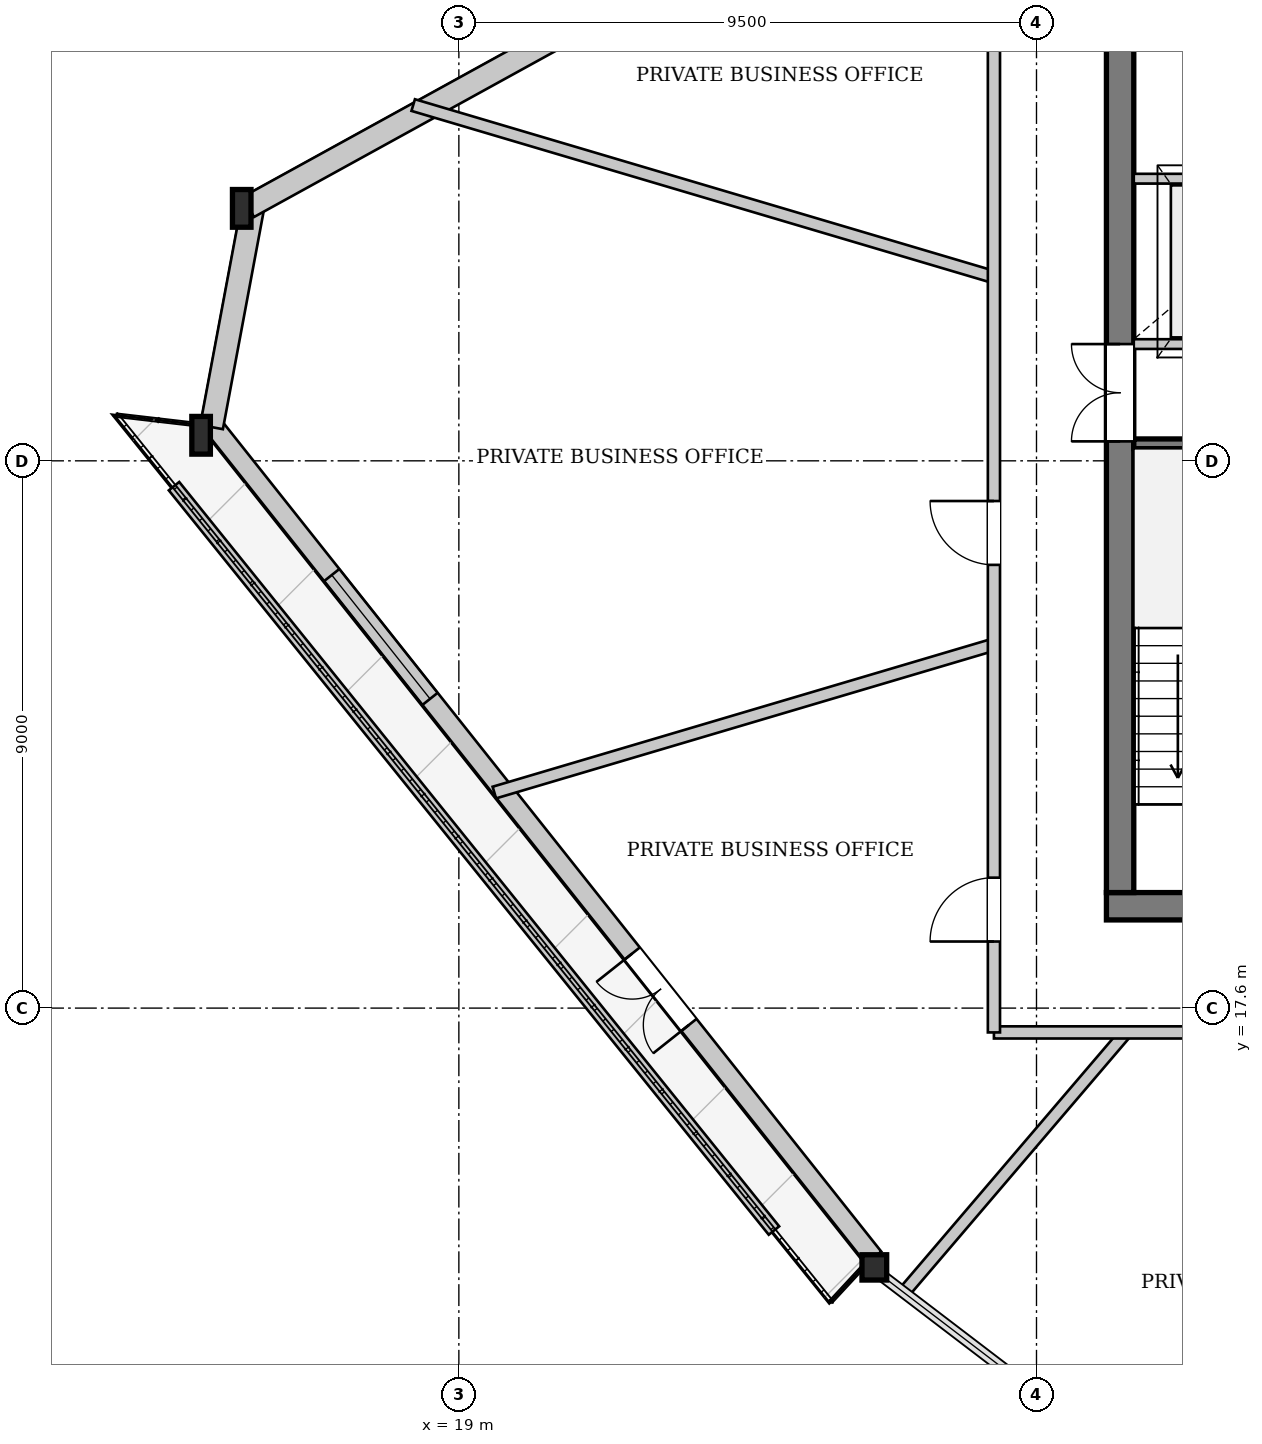
"""IFC4 building model, lengths in metres.
Left out: names, types, materials, properties, quantities, classifications, styles, units other than length and angle.
Written with IfcOpenShell. Run it as: python <this file> out.ifc"""

import sys

from ifc_helpers import new_model, si_unit, direction, frame, frame_2d, origin, origin_2d, place, context, subcontext, project, spatial, rectangle, i_section, extrude, source, transform, mapped, element, fill, save


model = new_model("IFC4")
c1 = context("Model", 3, precision=1e-05, world=origin(), true_north=direction((0.0, 1.0)))
c2 = subcontext(c1, "Body", "Model", "MODEL_VIEW")
j1 = project(units=[si_unit("LENGTHUNIT", "METRE"), si_unit("PLANEANGLEUNIT", "RADIAN")], contexts=[c1])
p1 = place(None, origin())
s1 = spatial("IfcSite", under=j1, at=p1, CompositionType="ELEMENT")
p2 = place(p1, origin())
s2 = spatial("IfcBuilding", under=s1, at=p2, CompositionType="ELEMENT")
p3 = place(p2, frame((0.0, 0.0, 227.35)))
s3 = spatial("IfcBuildingStorey", under=s2, at=p3, CompositionType="ELEMENT", Elevation=227.35)
m1 = source(origin(), c2, "Body", "SweptSolid", [
    extrude(i_section(OverallWidth=0.305, OverallDepth=0.62, WebThickness=0.021, FlangeThickness=0.04, at=origin_2d()), origin(), (0.0, 0.0, 1.0), 3.407),
])
p4 = place(p3, frame((15.448, 30.942, 0.0), z_axis=(-0.011036611477, -0.111942773549, 0.993653364437), x_axis=(0.99517500016, -0.098115845086, 0.0)))
e1 = element("IfcColumn", 1, at=p4, inside=s3, PredefinedType="COLUMN", context=c2, shape_type="MappedRepresentation", body=[
    mapped(m1, transform((0.0, 0.0, 0.0), x_axis=(1.0, 0.0, 0.0), y_axis=(0.0, 1.0, 0.0), z_axis=(0.0, 0.0, 1.0), scale=1.0)),
])
m2 = source(origin(), c2, "Body", "SweptSolid", [
    extrude(i_section(OverallWidth=0.305, OverallDepth=0.62, WebThickness=0.021, FlangeThickness=0.04, at=origin_2d()), origin(), (0.0, 0.0, 1.0), 3.402),
])
p5 = place(p3, frame((14.746, 27.19, 0.0), z_axis=(0.008898359586, -0.099819501483, 0.994965771432), x_axis=(0.9960501548, 0.088792393383, 0.0)))
e2 = element("IfcColumn", 2, at=p5, inside=s3, PredefinedType="COLUMN", context=c2, shape_type="MappedRepresentation", body=[
    mapped(m2, transform((0.0, 0.0, 0.0), x_axis=(1.0, 0.0, 0.0), y_axis=(0.0, 1.0, 0.0), z_axis=(0.0, 0.0, 1.0), scale=1.0)),
])
m3 = source(origin(), c2, "Body", "SweptSolid", [
    extrude(i_section(OverallWidth=0.406, OverallDepth=0.416, WebThickness=0.027, FlangeThickness=0.042, at=origin_2d()), origin(), (0.0, 0.0, 1.0), 3.398),
])
p6 = place(p3, frame((25.697, 13.397, 0.0), z_axis=(0.080321740107, -0.03599391037, 0.99611889676), x_axis=(0.40893871704, 0.912561847606, 0.0)))
e3 = element("IfcColumn", 3, at=p6, inside=s3, PredefinedType="COLUMN", context=c2, shape_type="MappedRepresentation", body=[
    mapped(m3, transform((0.0, 0.0, 0.0), x_axis=(1.0, 0.0, 0.0), y_axis=(0.0, 1.0, 0.0), z_axis=(0.0, 0.0, 1.0), scale=1.0)),
])
p7 = place(p3, frame((25.822, 13.497, 0.0), z_axis=(0.0, 0.0, 1.0), x_axis=(-0.621793124768, 0.783181530675, 0.0)))
e4 = element("IfcWall", 4, at=p7, inside=s3, PredefinedType="SOLIDWALL", context=c2, shape_type="SweptSolid", body=[
    extrude(rectangle(XDim=17.612, YDim=0.32, at=frame_2d((8.806, 0.0))), origin(), (0.0, 0.0, 1.0), 2.822),
])
p8 = place(p7, frame((4.886, 0.0, 0.0)))
e5 = element("IfcOpeningElement", 5, at=p8, cuts=e4, PredefinedType="OPENING", context=c2, shape_type="SweptSolid", body=[
    extrude(rectangle(XDim=1.5, YDim=2.3, at=frame_2d((0.75, 1.15))), frame((0.0, 0.17, 0.0), z_axis=(0.0, -1.0, 0.0), x_axis=(1.0, 0.0, 0.0)), (0.0, 0.0, 1.0), 0.34),
])
p9 = place(p7, frame((11.733, 0.0, 0.352)))
e6 = element("IfcOpeningElement", 6, at=p9, cuts=e4, PredefinedType="OPENING", context=c2, shape_type="SweptSolid", body=[
    extrude(rectangle(XDim=2.6, YDim=2.35, at=frame_2d((1.3, 1.175))), frame((0.0, 0.17, 0.0), z_axis=(0.0, -1.0, 0.0), x_axis=(1.0, 0.0, 0.0)), (0.0, 0.0, 1.0), 0.34),
])
p10 = place(p3, frame((14.933, 27.155, 0.0), z_axis=(0.0, 0.0, 1.0), x_axis=(0.183852218536, 0.98295389604, 0.0)))
e7 = element("IfcWall", 7, at=p10, inside=s3, PredefinedType="SOLIDWALL", context=c2, shape_type="SweptSolid", body=[
    extrude(rectangle(XDim=3.818, YDim=0.38, at=frame_2d((1.909, 0.0))), origin(), (0.0, 0.0, 1.0), 2.822),
])
p11 = place(p3, frame((15.539, 30.776, 0.0), z_axis=(0.0, 0.0, 1.0), x_axis=(0.876021364286, 0.482272297892, 0.0)))
e8 = element("IfcWall", 8, at=p11, inside=s3, PredefinedType="SOLIDWALL", context=c2, shape_type="SweptSolid", body=[
    extrude(rectangle(XDim=22.397, YDim=0.38, at=frame_2d((11.199, 0.0))), origin(), (0.0, 0.0, 1.0), 2.822),
])
p12 = place(p11, frame((5.671, 0.0, 0.65)))
e9 = element("IfcOpeningElement", 9, at=p12, cuts=e8, PredefinedType="OPENING", context=c2, shape_type="SweptSolid", body=[
    extrude(rectangle(XDim=1.2, YDim=1.5, at=frame_2d((0.6, 0.75))), frame((0.0, 0.2, 0.0), z_axis=(0.0, -1.0, 0.0), x_axis=(1.0, 0.0, 0.0)), (0.0, 0.0, 1.0), 0.4),
])
p13 = place(p11, frame((15.526, 0.0, 0.65)))
e10 = element("IfcOpeningElement", 10, at=p13, cuts=e8, PredefinedType="OPENING", context=c2, shape_type="SweptSolid", body=[
    extrude(rectangle(XDim=1.2, YDim=1.5, at=frame_2d((0.6, 0.75))), frame((0.0, 0.2, 0.0), z_axis=(0.0, -1.0, 0.0), x_axis=(1.0, 0.0, 0.0)), (0.0, 0.0, 1.0), 0.4),
])
p14 = place(p3, frame((14.315, 26.183, 0.0), z_axis=(0.0, 0.0, 1.0), x_axis=(0.627542704466, -0.778582143432, 0.0)))
e11 = element("IfcWall", 11, at=p14, inside=s3, PredefinedType="PARAPET", context=c2, shape_type="SweptSolid", body=[
    extrude(rectangle(XDim=15.723, YDim=0.22, at=frame_2d((7.861, 0.0))), origin(), (0.0, 0.0, 1.0), 0.3),
])
p15 = place(p3, frame((46.35, 19.275, 0.0), z_axis=(0.0, 0.0, 1.0), x_axis=(-1.0, 0.0, 0.0)))
e12 = element("IfcWall", 12, at=p15, inside=s3, PredefinedType="SHEAR", context=c2, shape_type="SweptSolid", body=[
    extrude(rectangle(XDim=16.7, YDim=0.45, at=frame_2d((8.35, 0.0))), origin(), (0.0, 0.0, 1.0), 3.33),
])
p16 = place(p15, frame((4.55, 0.0, 0.0)))
e13 = element("IfcOpeningElement", 13, at=p16, cuts=e12, PredefinedType="OPENING", context=c2, shape_type="SweptSolid", body=[
    extrude(rectangle(XDim=1.12, YDim=2.25, at=frame_2d((0.56, 1.125))), frame((0.0, 0.235, 0.0), z_axis=(0.0, -1.0, 0.0), x_axis=(1.0, 0.0, 0.0)), (0.0, 0.0, 1.0), 0.47),
])
p17 = place(p15, frame((11.05, 0.0, 0.0)))
e14 = element("IfcOpeningElement", 14, at=p17, cuts=e12, PredefinedType="OPENING", context=c2, shape_type="SweptSolid", body=[
    extrude(rectangle(XDim=1.12, YDim=2.25, at=frame_2d((0.56, 1.125))), frame((0.0, 0.235, 0.0), z_axis=(0.0, -1.0, 0.0), x_axis=(1.0, 0.0, 0.0)), (0.0, 0.0, 1.0), 0.47),
])
p18 = place(p3, frame((29.875, 19.5, 0.0), z_axis=(0.0, 0.0, 1.0), x_axis=(0.0, 1.0, 0.0)))
e15 = element("IfcWall", 15, at=p18, inside=s3, PredefinedType="SHEAR", context=c2, shape_type="SweptSolid", body=[
    extrude(rectangle(XDim=14.2, YDim=0.45, at=frame_2d((7.1, 0.0))), origin(), (0.0, 0.0, 1.0), 3.33),
])
p19 = place(p18, frame((7.42, 0.0, 0.0)))
e16 = element("IfcOpeningElement", 16, at=p19, cuts=e15, PredefinedType="OPENING", context=c2, shape_type="SweptSolid", body=[
    extrude(rectangle(XDim=1.6, YDim=2.2, at=frame_2d((0.8, 1.1))), frame((0.0, 0.235, 0.0), z_axis=(0.0, -1.0, 0.0), x_axis=(1.0, 0.0, 0.0)), (0.0, 0.0, 1.0), 0.47),
])
for number, where, z_axis, x_axis in (
    (17, (30.1, 26.88, 0.0), (0.0, 0.0, 1.0), (1.0, 0.0, 0.0)),
    (18, (30.1, 28.52, 0.0), (0.0, 0.0, 1.0), (1.0, 0.0, 0.0)),
):
    element("IfcWall", number, at=place(p3, frame(where, z_axis=z_axis, x_axis=x_axis)), inside=s3, PredefinedType="PARTITIONING", context=c2, shape_type="SweptSolid", body=[
        extrude(rectangle(XDim=3.02, YDim=0.16, at=frame_2d((1.51, 0.0))), origin(), (0.0, 0.0, 1.0), 3.33),
    ])
p20 = place(p3, frame((30.1, 31.24, 0.0), z_axis=(0.0, 0.0, 1.0), x_axis=(1.0, 0.0, 0.0)))
e19 = element("IfcWall", 19, at=p20, inside=s3, PredefinedType="PARTITIONING", context=c2, shape_type="SweptSolid", body=[
    extrude(rectangle(XDim=3.02, YDim=0.16, at=frame_2d((1.51, 0.0))), origin(), (0.0, 0.0, 1.0), 3.33),
])
p21 = place(p20, frame((0.91, 0.0, 0.0)))
e20 = element("IfcOpeningElement", 20, at=p21, cuts=e19, PredefinedType="OPENING", context=c2, shape_type="SweptSolid", body=[
    extrude(rectangle(XDim=1.2, YDim=2.2, at=frame_2d((0.6, 1.1))), frame((0.0, 0.09, 0.0), z_axis=(0.0, -1.0, 0.0), x_axis=(1.0, 0.0, 0.0)), (0.0, 0.0, 1.0), 0.18),
])
p22 = place(p3, frame((27.8, 29.621, 0.0), z_axis=(0.0, 0.0, 1.0), x_axis=(-0.958820857055, 0.284011556237, 0.0)))
e21 = element("IfcWall", 21, at=p22, inside=s3, PredefinedType="PARTITIONING", context=c2, shape_type="SweptSolid", body=[
    extrude(rectangle(XDim=9.961, YDim=0.2, at=frame_2d((4.98, 0.0))), origin(), (0.0, 0.0, 1.0), 3.33),
])
p23 = place(p3, frame((27.8, 23.579, 0.0), z_axis=(0.0, 0.0, 1.0), x_axis=(-0.958820240498, -0.284013637722, 0.0)))
e22 = element("IfcWall", 22, at=p23, inside=s3, PredefinedType="PARTITIONING", context=c2, shape_type="SweptSolid", body=[
    extrude(rectangle(XDim=8.569, YDim=0.2, at=frame_2d((4.285, 0.0))), origin(), (0.0, 0.0, 1.0), 3.33),
])
p24 = place(p3, frame((29.972, 17.2, 0.0), z_axis=(0.0, 0.0, 1.0), x_axis=(-0.649446430955, -0.760407346966, 0.0)))
e23 = element("IfcWall", 23, at=p24, inside=s3, PredefinedType="PARTITIONING", context=c2, shape_type="SweptSolid", body=[
    extrude(rectangle(XDim=5.595, YDim=0.2, at=frame_2d((2.798, 0.0))), origin(), (0.0, 0.0, 1.0), 3.33),
])
p25 = place(p3, frame((27.8, 17.2, 0.0), z_axis=(0.0, 0.0, 1.0), x_axis=(1.0, 0.0, 0.0)))
e24 = element("IfcWall", 24, at=p25, inside=s3, PredefinedType="PARTITIONING", context=c2, shape_type="SweptSolid", body=[
    extrude(rectangle(XDim=20.4, YDim=0.2, at=frame_2d((10.2, 0.0))), origin(), (0.0, 0.0, 1.0), 3.33),
])
p26 = place(p25, frame((5.042, 0.0, 0.0)))
e25 = element("IfcOpeningElement", 25, at=p26, cuts=e24, PredefinedType="OPENING", context=c2, shape_type="SweptSolid", body=[
    extrude(rectangle(XDim=1.05, YDim=2.2, at=frame_2d((0.525, 1.1))), frame((0.0, 0.11, 0.0), z_axis=(0.0, -1.0, 0.0), x_axis=(1.0, 0.0, 0.0)), (0.0, 0.0, 1.0), 0.22),
])
p27 = place(p25, frame((11.925, 0.0, 0.0)))
e26 = element("IfcOpeningElement", 26, at=p27, cuts=e24, PredefinedType="OPENING", context=c2, shape_type="SweptSolid", body=[
    extrude(rectangle(XDim=1.05, YDim=2.2, at=frame_2d((0.525, 1.1))), frame((0.0, 0.11, 0.0), z_axis=(0.0, -1.0, 0.0), x_axis=(1.0, 0.0, 0.0)), (0.0, 0.0, 1.0), 0.22),
])
p28 = place(p25, frame((17.55, 0.0, 0.0)))
e27 = element("IfcOpeningElement", 27, at=p28, cuts=e24, PredefinedType="OPENING", context=c2, shape_type="SweptSolid", body=[
    extrude(rectangle(XDim=1.05, YDim=2.2, at=frame_2d((0.525, 1.1))), frame((0.0, 0.11, 0.0), z_axis=(0.0, -1.0, 0.0), x_axis=(1.0, 0.0, 0.0)), (0.0, 0.0, 1.0), 0.22),
])
p29 = place(p3, frame((27.8, 17.2, 0.0), z_axis=(0.0, 0.0, 1.0), x_axis=(0.0, 1.0, 0.0)))
e28 = element("IfcWall", 28, at=p29, inside=s3, PredefinedType="PARTITIONING", context=c2, shape_type="SweptSolid", body=[
    extrude(rectangle(XDim=18.8, YDim=0.2, at=frame_2d((9.4, 0.0))), origin(), (0.0, 0.0, 1.0), 3.33),
])
p30 = place(p29, frame((16.438, 0.0, 0.0)))
e29 = element("IfcOpeningElement", 29, at=p30, cuts=e28, PredefinedType="OPENING", context=c2, shape_type="SweptSolid", body=[
    extrude(rectangle(XDim=1.05, YDim=2.2, at=frame_2d((0.525, 1.1))), frame((0.0, 0.11, 0.0), z_axis=(0.0, -1.0, 0.0), x_axis=(1.0, 0.0, 0.0)), (0.0, 0.0, 1.0), 0.22),
])
p31 = place(p29, frame((7.689, 0.0, 0.0)))
e30 = element("IfcOpeningElement", 30, at=p31, cuts=e28, PredefinedType="OPENING", context=c2, shape_type="SweptSolid", body=[
    extrude(rectangle(XDim=1.05, YDim=2.2, at=frame_2d((0.525, 1.1))), frame((0.0, 0.11, 0.0), z_axis=(0.0, -1.0, 0.0), x_axis=(1.0, 0.0, 0.0)), (0.0, 0.0, 1.0), 0.22),
])
p32 = place(p29, frame((1.495, 0.0, 0.0)))
e31 = element("IfcOpeningElement", 31, at=p32, cuts=e28, PredefinedType="OPENING", context=c2, shape_type="SweptSolid", body=[
    extrude(rectangle(XDim=1.05, YDim=2.2, at=frame_2d((0.525, 1.1))), frame((0.0, 0.11, 0.0), z_axis=(0.0, -1.0, 0.0), x_axis=(1.0, 0.0, 0.0)), (0.0, 0.0, 1.0), 0.22),
])
m4 = source(origin(), c2, "Body", "SweptSolid", [
    extrude(rectangle(XDim=1.5, YDim=2.3, at=frame_2d((0.75, 1.15))), frame((0.0, 0.025, 0.0), z_axis=(0.0, -1.0, 0.0), x_axis=(1.0, 0.0, 0.0)), (0.0, 0.0, 1.0), 0.05),
])
p33 = place(p8, origin())
e32 = element("IfcDoor", 32, at=p33, inside=s3, OperationType="DOUBLE_DOOR_SINGLE_SWING", PredefinedType="DOOR", context=c2, shape_type="MappedRepresentation", body=[
    mapped(m4, transform((0.0, 0.0, 0.0), x_axis=(1.0, 0.0, 0.0), y_axis=(0.0, 1.0, 0.0), z_axis=(0.0, 0.0, 1.0), scale=1.0)),
])
fill(e5, e32)
m5 = source(origin(), c2, "Body", "SweptSolid", [
    extrude(rectangle(XDim=2.6, YDim=2.35, at=frame_2d((1.3, 1.175))), frame((0.0, 0.03, 0.0), z_axis=(0.0, -1.0, 0.0), x_axis=(1.0, 0.0, 0.0)), (0.0, 0.0, 1.0), 0.06),
])
p34 = place(p9, origin())
e33 = element("IfcWindow", 33, at=p34, inside=s3, PartitioningType="SINGLE_PANEL", PredefinedType="WINDOW", context=c2, shape_type="MappedRepresentation", body=[
    mapped(m5, transform((0.0, 0.0, 0.0), x_axis=(1.0, 0.0, 0.0), y_axis=(0.0, 1.0, 0.0), z_axis=(0.0, 0.0, 1.0), scale=1.0)),
])
fill(e6, e33)
m6 = source(origin(), c2, "Body", "SweptSolid", [
    extrude(rectangle(XDim=1.6, YDim=2.2, at=frame_2d((0.8, 1.1))), frame((0.0, 0.025, 0.0), z_axis=(0.0, -1.0, 0.0), x_axis=(1.0, 0.0, 0.0)), (0.0, 0.0, 1.0), 0.05),
])
p35 = place(p19, origin())
e34 = element("IfcDoor", 34, at=p35, inside=s3, OperationType="DOUBLE_DOOR_SINGLE_SWING", PredefinedType="DOOR", context=c2, shape_type="MappedRepresentation", body=[
    mapped(m6, transform((0.0, 0.0, 0.0), x_axis=(1.0, 0.0, 0.0), y_axis=(0.0, 1.0, 0.0), z_axis=(0.0, 0.0, 1.0), scale=1.0)),
])
fill(e16, e34)
m7 = source(origin(), c2, "Body", "SweptSolid", [
    extrude(rectangle(XDim=1.05, YDim=2.2, at=frame_2d((0.525, 1.1))), frame((0.0, 0.025, 0.0), z_axis=(0.0, -1.0, 0.0), x_axis=(1.0, 0.0, 0.0)), (0.0, 0.0, 1.0), 0.05),
])
p36 = place(p31, origin())
e35 = element("IfcDoor", 35, at=p36, inside=s3, OperationType="SINGLE_SWING_RIGHT", PredefinedType="DOOR", context=c2, shape_type="MappedRepresentation", body=[
    mapped(m7, transform((0.0, 0.0, 0.0), x_axis=(1.0, 0.0, 0.0), y_axis=(0.0, 1.0, 0.0), z_axis=(0.0, 0.0, 1.0), scale=1.0)),
])
fill(e30, e35)
p37 = place(p32, origin())
e36 = element("IfcDoor", 36, at=p37, inside=s3, OperationType="SINGLE_SWING_LEFT", PredefinedType="DOOR", context=c2, shape_type="MappedRepresentation", body=[
    mapped(m7, transform((0.0, 0.0, 0.0), x_axis=(1.0, 0.0, 0.0), y_axis=(0.0, 1.0, 0.0), z_axis=(0.0, 0.0, 1.0), scale=1.0)),
])
fill(e31, e36)
save(model, sys.argv[1])
